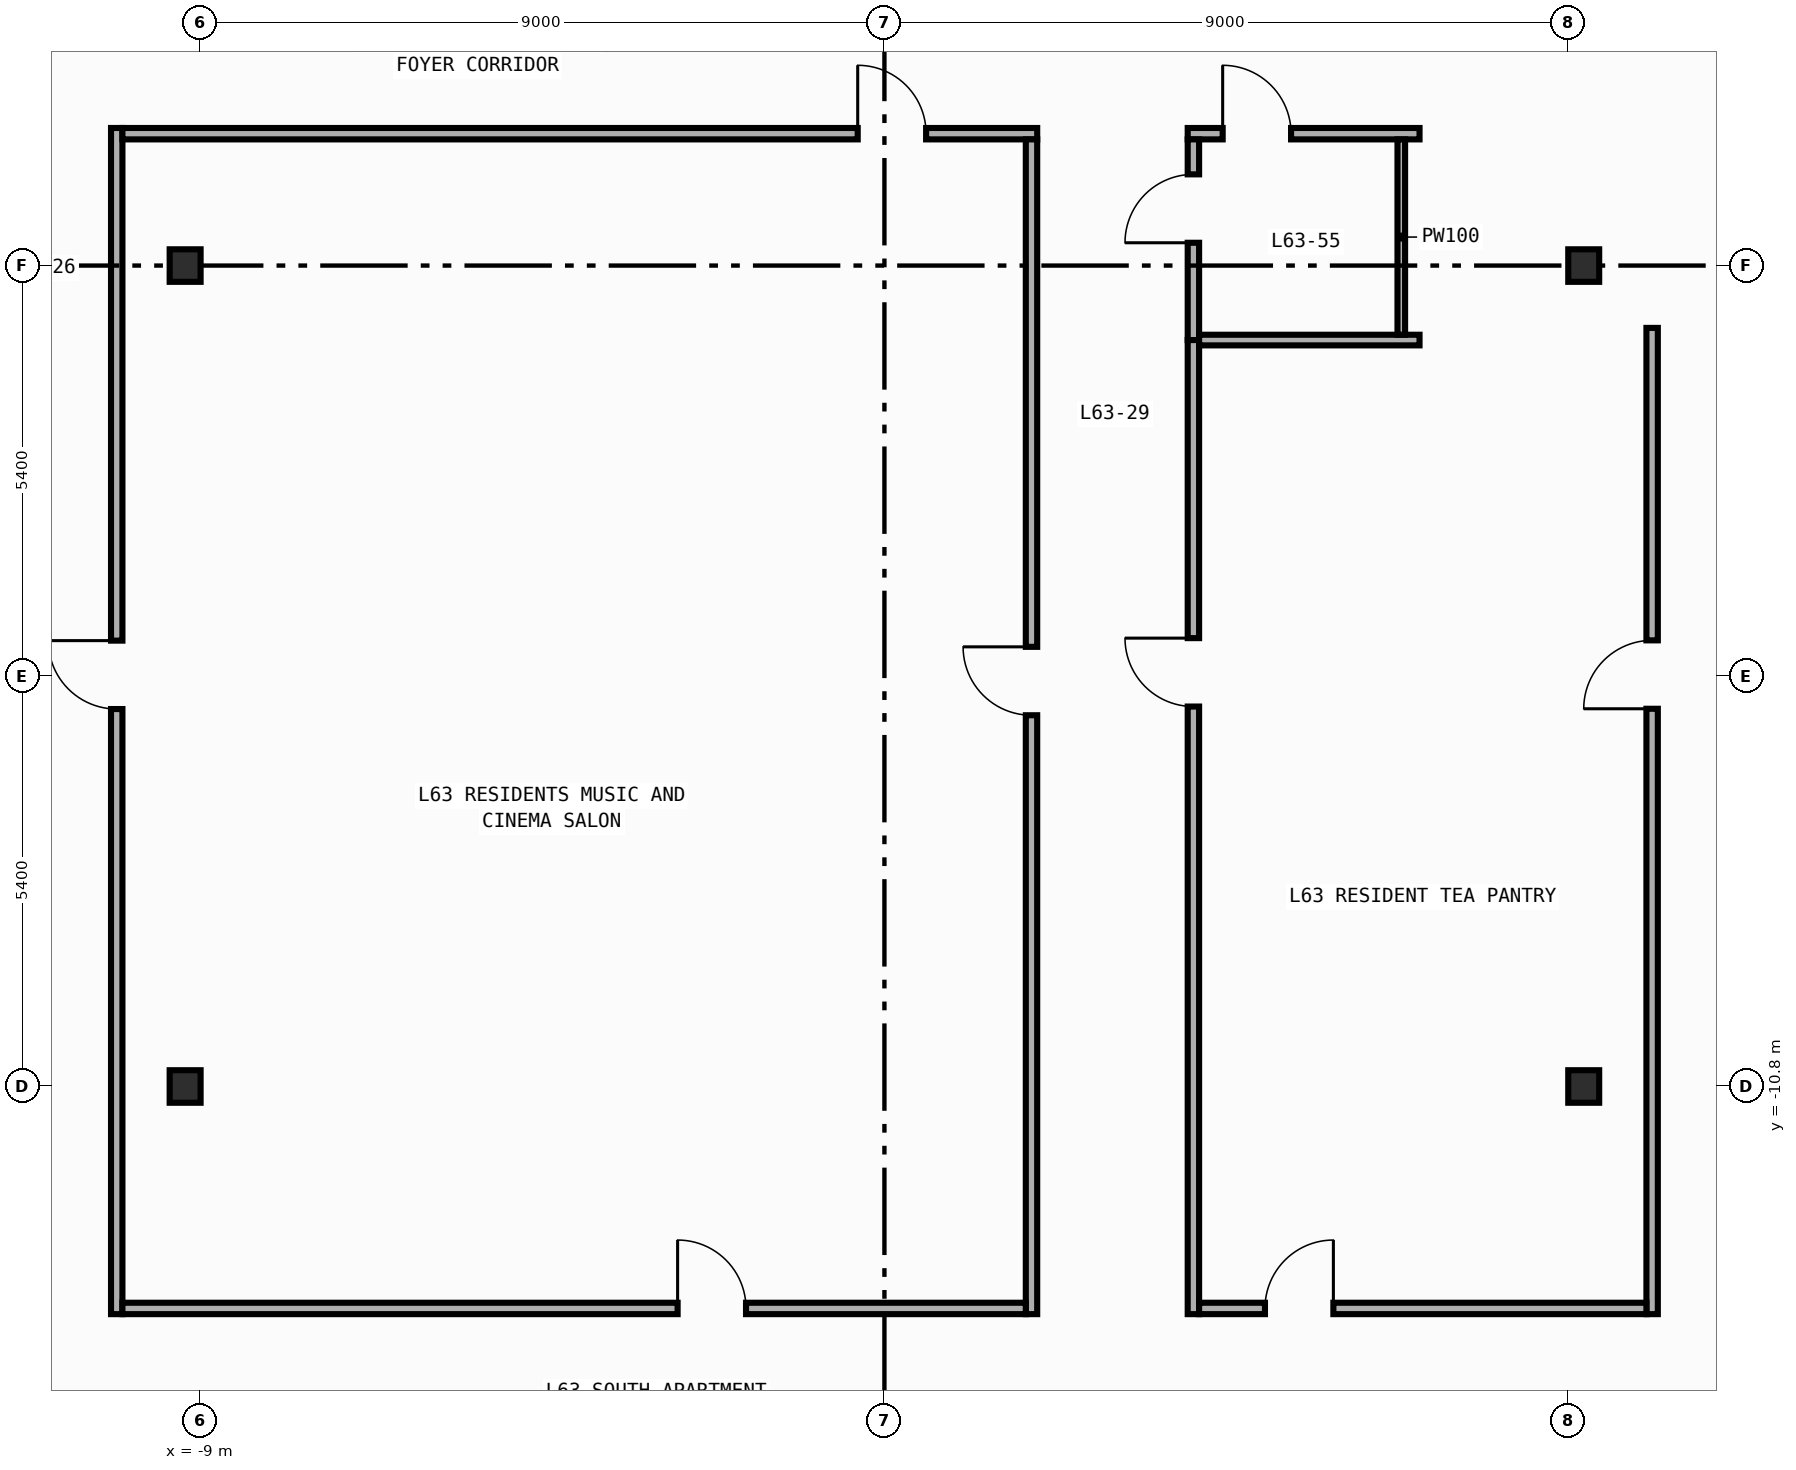
"""IFC4 building model, lengths in metres.
Left out: names, types, materials, properties, quantities, classifications, styles, units other than length and angle.
Written with IfcOpenShell. Run it as: python <this file> out.ifc"""

import sys

from ifc_helpers import new_model, si_unit, direction, frame, frame_2d, origin, origin_2d, place, context, subcontext, project, spatial, rectangle, i_section, extrude, element, fill, save


model = new_model("IFC4")
c1 = context("Model", 3, precision=1e-05, world=origin(), true_north=direction((0.0, 1.0)))
c2 = subcontext(c1, "Body", "Model", "MODEL_VIEW")
j1 = project(units=[si_unit("LENGTHUNIT", "METRE"), si_unit("PLANEANGLEUNIT", "RADIAN")], contexts=[c1])
p1 = place(None, origin())
s1 = spatial("IfcSite", under=j1, at=p1, CompositionType="ELEMENT")
p2 = place(p1, origin())
s2 = spatial("IfcBuilding", under=s1, at=p2, CompositionType="ELEMENT")
p3 = place(p2, frame((0.0, 0.0, 265.6)))
s3 = spatial("IfcBuildingStorey", under=s2, at=p3, CompositionType="ELEMENT", Elevation=265.6)
for number, where, z_axis, x_axis in (
    (1, (-9.2, -10.8, 0.0), (0.0, 0.0, 1.0), (1.0, 0.0, 0.0)),
    (2, (-9.2, 0.0, 0.0), (0.0, 0.0, 1.0), (1.0, 0.0, 0.0)),
    (3, (9.2, -10.8, 0.0), (0.0, 0.0, 1.0), (1.0, 0.0, 0.0)),
    (4, (9.2, 0.0, 0.0), (0.0, 0.0, 1.0), (1.0, 0.0, 0.0)),
):
    element("IfcColumn", number, at=place(p3, frame(where, z_axis=z_axis, x_axis=x_axis)), inside=s3, PredefinedType="COLUMN", context=c2, shape_type="SweptSolid", body=[
        extrude(i_section(OverallWidth=0.407, OverallDepth=0.428, WebThickness=0.02, FlangeThickness=0.035, FilletRadius=0.022, at=origin_2d()), origin(), (0.0, 0.0, 1.0), 3.6),
    ])
p4 = place(p3, frame((-10.1, -13.795, 0.0), z_axis=(0.0, 0.0, 1.0), x_axis=(0.0, 1.0, 0.0)))
e5 = element("IfcWall", 5, at=p4, inside=s3, PredefinedType="PARTITIONING", context=c2, shape_type="SweptSolid", body=[
    extrude(rectangle(XDim=15.605, YDim=0.15, at=frame_2d((7.802, 0.0))), origin(), (0.0, 0.0, 1.0), 3.34),
])
p5 = place(p4, frame((7.961, 0.0, 0.0)))
e6 = element("IfcOpeningElement", 6, at=p5, cuts=e5, PredefinedType="OPENING", context=c2, shape_type="SweptSolid", body=[
    extrude(rectangle(XDim=0.9, YDim=2.15, at=frame_2d((0.45, 1.075))), frame((0.0, 0.085, 0.0), z_axis=(0.0, -1.0, 0.0), x_axis=(1.0, 0.0, 0.0)), (0.0, 0.0, 1.0), 0.17),
])
p6 = place(p3, frame((10.1, -13.795, 0.0), z_axis=(0.0, 0.0, 1.0), x_axis=(0.0, 1.0, 0.0)))
e7 = element("IfcWall", 7, at=p6, inside=s3, PredefinedType="PARTITIONING", context=c2, shape_type="SweptSolid", body=[
    extrude(rectangle(XDim=12.975, YDim=0.15, at=frame_2d((6.487, 0.0))), origin(), (0.0, 0.0, 1.0), 3.34),
])
p7 = place(p6, frame((7.964, 0.0, 0.0)))
e8 = element("IfcOpeningElement", 8, at=p7, cuts=e7, PredefinedType="OPENING", context=c2, shape_type="SweptSolid", body=[
    extrude(rectangle(XDim=0.9, YDim=2.15, at=frame_2d((0.45, 1.075))), frame((0.0, 0.085, 0.0), z_axis=(0.0, -1.0, 0.0), x_axis=(1.0, 0.0, 0.0)), (0.0, 0.0, 1.0), 0.17),
])
p8 = place(p3, frame((-10.025, 1.735, 0.0), z_axis=(0.0, 0.0, 1.0), x_axis=(1.0, 0.0, 0.0)))
e9 = element("IfcWall", 9, at=p8, inside=s3, PredefinedType="PARTITIONING", context=c2, shape_type="SweptSolid", body=[
    extrude(rectangle(XDim=12.035, YDim=0.15, at=frame_2d((6.018, 0.0))), origin(), (0.0, 0.0, 1.0), 3.34),
])
p9 = place(p8, frame((9.674, 0.0, 0.0)))
e10 = element("IfcOpeningElement", 10, at=p9, cuts=e9, PredefinedType="OPENING", context=c2, shape_type="SweptSolid", body=[
    extrude(rectangle(XDim=0.9, YDim=2.15, at=frame_2d((0.45, 1.075))), frame((0.0, 0.085, 0.0), z_axis=(0.0, -1.0, 0.0), x_axis=(1.0, 0.0, 0.0)), (0.0, 0.0, 1.0), 0.17),
])
p10 = place(p3, frame((3.99, 1.735, 0.0), z_axis=(0.0, 0.0, 1.0), x_axis=(1.0, 0.0, 0.0)))
e11 = element("IfcWall", 11, at=p10, inside=s3, PredefinedType="PARTITIONING", context=c2, shape_type="SweptSolid", body=[
    extrude(rectangle(XDim=3.05, YDim=0.15, at=frame_2d((1.525, 0.0))), origin(), (0.0, 0.0, 1.0), 3.34),
])
p11 = place(p10, frame((0.46, 0.0, 0.0)))
e12 = element("IfcOpeningElement", 12, at=p11, cuts=e11, PredefinedType="OPENING", context=c2, shape_type="SweptSolid", body=[
    extrude(rectangle(XDim=0.9, YDim=2.15, at=frame_2d((0.45, 1.075))), frame((0.0, 0.085, 0.0), z_axis=(0.0, -1.0, 0.0), x_axis=(1.0, 0.0, 0.0)), (0.0, 0.0, 1.0), 0.17),
])
p12 = place(p3, frame((1.935, -13.795, 0.0), z_axis=(0.0, 0.0, 1.0), x_axis=(0.0, 1.0, 0.0)))
e13 = element("IfcWall", 13, at=p12, inside=s3, PredefinedType="PARTITIONING", context=c2, shape_type="SweptSolid", body=[
    extrude(rectangle(XDim=15.455, YDim=0.15, at=frame_2d((7.728, 0.0))), origin(), (0.0, 0.0, 1.0), 3.34),
])
p13 = place(p12, frame((7.879, 0.0, 0.0)))
e14 = element("IfcOpeningElement", 14, at=p13, cuts=e13, PredefinedType="OPENING", context=c2, shape_type="SweptSolid", body=[
    extrude(rectangle(XDim=0.9, YDim=2.15, at=frame_2d((0.45, 1.075))), frame((0.0, 0.085, 0.0), z_axis=(0.0, -1.0, 0.0), x_axis=(1.0, 0.0, 0.0)), (0.0, 0.0, 1.0), 0.17),
])
p14 = place(p3, frame((4.065, -0.98, 0.0), z_axis=(0.0, 0.0, 1.0), x_axis=(0.0, 1.0, 0.0)))
e15 = element("IfcWall", 15, at=p14, inside=s3, PredefinedType="PARTITIONING", context=c2, shape_type="SweptSolid", body=[
    extrude(rectangle(XDim=2.64, YDim=0.15, at=frame_2d((1.32, 0.0))), origin(), (0.0, 0.0, 1.0), 3.34),
])
p15 = place(p14, frame((1.28, 0.0, 0.0)))
e16 = element("IfcOpeningElement", 16, at=p15, cuts=e15, PredefinedType="OPENING", context=c2, shape_type="SweptSolid", body=[
    extrude(rectangle(XDim=0.9, YDim=2.15, at=frame_2d((0.45, 1.075))), frame((0.0, 0.085, 0.0), z_axis=(0.0, -1.0, 0.0), x_axis=(1.0, 0.0, 0.0)), (0.0, 0.0, 1.0), 0.17),
])
p16 = place(p3, frame((4.065, -13.795, 0.0), z_axis=(0.0, 0.0, 1.0), x_axis=(0.0, 1.0, 0.0)))
e17 = element("IfcWall", 17, at=p16, inside=s3, PredefinedType="PARTITIONING", context=c2, shape_type="SweptSolid", body=[
    extrude(rectangle(XDim=12.815, YDim=0.15, at=frame_2d((6.407, 0.0))), origin(), (0.0, 0.0, 1.0), 3.34),
])
p17 = place(p16, frame((7.994, 0.0, 0.0)))
e18 = element("IfcOpeningElement", 18, at=p17, cuts=e17, PredefinedType="OPENING", context=c2, shape_type="SweptSolid", body=[
    extrude(rectangle(XDim=0.9, YDim=2.15, at=frame_2d((0.45, 1.075))), frame((0.0, 0.085, 0.0), z_axis=(0.0, -1.0, 0.0), x_axis=(1.0, 0.0, 0.0)), (0.0, 0.0, 1.0), 0.17),
])
p18 = place(p3, frame((-10.025, -13.72, 0.0), z_axis=(0.0, 0.0, 1.0), x_axis=(1.0, 0.0, 0.0)))
e19 = element("IfcWall", 19, at=p18, inside=s3, PredefinedType="PARTITIONING", context=c2, shape_type="SweptSolid", body=[
    extrude(rectangle(XDim=11.885, YDim=0.15, at=frame_2d((5.942, 0.0))), origin(), (0.0, 0.0, 1.0), 3.34),
])
p19 = place(p18, frame((7.304, 0.0, 0.0)))
e20 = element("IfcOpeningElement", 20, at=p19, cuts=e19, PredefinedType="OPENING", context=c2, shape_type="SweptSolid", body=[
    extrude(rectangle(XDim=0.9, YDim=2.15, at=frame_2d((0.45, 1.075))), frame((0.0, 0.085, 0.0), z_axis=(0.0, -1.0, 0.0), x_axis=(1.0, 0.0, 0.0)), (0.0, 0.0, 1.0), 0.17),
])
p20 = place(p3, frame((4.14, -13.72, 0.0), z_axis=(0.0, 0.0, 1.0), x_axis=(1.0, 0.0, 0.0)))
e21 = element("IfcWall", 21, at=p20, inside=s3, PredefinedType="PARTITIONING", context=c2, shape_type="SweptSolid", body=[
    extrude(rectangle(XDim=5.885, YDim=0.15, at=frame_2d((2.942, 0.0))), origin(), (0.0, 0.0, 1.0), 3.34),
])
p21 = place(p20, frame((0.866, 0.0, 0.0)))
e22 = element("IfcOpeningElement", 22, at=p21, cuts=e21, PredefinedType="OPENING", context=c2, shape_type="SweptSolid", body=[
    extrude(rectangle(XDim=0.9, YDim=2.15, at=frame_2d((0.45, 1.075))), frame((0.0, 0.085, 0.0), z_axis=(0.0, -1.0, 0.0), x_axis=(1.0, 0.0, 0.0)), (0.0, 0.0, 1.0), 0.17),
])
p22 = place(p3, frame((4.14, -0.98, 0.0), z_axis=(0.0, 0.0, 1.0), x_axis=(1.0, 0.0, 0.0)))
e23 = element("IfcWall", 23, at=p22, inside=s3, PredefinedType="PARTITIONING", context=c2, shape_type="SweptSolid", body=[
    extrude(rectangle(XDim=2.9, YDim=0.14, at=frame_2d((1.45, 0.0))), origin(), (0.0, 0.0, 1.0), 3.34),
])
p23 = place(p3, frame((6.8, 1.66, 0.0), z_axis=(0.0, 0.0, 1.0), x_axis=(0.0, -1.0, 0.0)))
e24 = element("IfcWall", 24, at=p23, inside=s3, PredefinedType="PARTITIONING", context=c2, shape_type="SweptSolid", body=[
    extrude(rectangle(XDim=2.57, YDim=0.1, at=frame_2d((1.285, 0.0))), origin(), (0.0, 0.0, 1.0), 3.34),
])
p24 = place(p5, origin())
e25 = element("IfcDoor", 25, at=p24, inside=s3, OperationType="SINGLE_SWING_RIGHT", PredefinedType="DOOR", context=c2, shape_type="SweptSolid", body=[
    extrude(rectangle(XDim=0.9, YDim=2.15, at=frame_2d((0.45, 1.075))), frame((0.0, 0.025, 0.0), z_axis=(0.0, -1.0, 0.0), x_axis=(1.0, 0.0, 0.0)), (0.0, 0.0, 1.0), 0.05),
])
fill(e6, e25)
p25 = place(p7, origin())
e26 = element("IfcDoor", 26, at=p25, inside=s3, OperationType="SINGLE_SWING_LEFT", PredefinedType="DOOR", context=c2, shape_type="SweptSolid", body=[
    extrude(rectangle(XDim=0.9, YDim=2.15, at=frame_2d((0.45, 1.075))), frame((0.0, 0.025, 0.0), z_axis=(0.0, -1.0, 0.0), x_axis=(1.0, 0.0, 0.0)), (0.0, 0.0, 1.0), 0.05),
])
fill(e8, e26)
p26 = place(p9, origin())
e27 = element("IfcDoor", 27, at=p26, inside=s3, OperationType="SINGLE_SWING_LEFT", PredefinedType="DOOR", context=c2, shape_type="SweptSolid", body=[
    extrude(rectangle(XDim=0.9, YDim=2.15, at=frame_2d((0.45, 1.075))), frame((0.0, 0.025, 0.0), z_axis=(0.0, -1.0, 0.0), x_axis=(1.0, 0.0, 0.0)), (0.0, 0.0, 1.0), 0.05),
])
fill(e10, e27)
p27 = place(p11, origin())
e28 = element("IfcDoor", 28, at=p27, inside=s3, OperationType="SINGLE_SWING_LEFT", PredefinedType="DOOR", context=c2, shape_type="SweptSolid", body=[
    extrude(rectangle(XDim=0.9, YDim=2.15, at=frame_2d((0.45, 1.075))), frame((0.0, 0.025, 0.0), z_axis=(0.0, -1.0, 0.0), x_axis=(1.0, 0.0, 0.0)), (0.0, 0.0, 1.0), 0.05),
])
fill(e12, e28)
p28 = place(p13, origin())
e29 = element("IfcDoor", 29, at=p28, inside=s3, OperationType="SINGLE_SWING_RIGHT", PredefinedType="DOOR", context=c2, shape_type="SweptSolid", body=[
    extrude(rectangle(XDim=0.9, YDim=2.15, at=frame_2d((0.45, 1.075))), frame((0.0, 0.025, 0.0), z_axis=(0.0, -1.0, 0.0), x_axis=(1.0, 0.0, 0.0)), (0.0, 0.0, 1.0), 0.05),
])
fill(e14, e29)
p29 = place(p15, origin())
e30 = element("IfcDoor", 30, at=p29, inside=s3, OperationType="SINGLE_SWING_LEFT", PredefinedType="DOOR", context=c2, shape_type="SweptSolid", body=[
    extrude(rectangle(XDim=0.9, YDim=2.15, at=frame_2d((0.45, 1.075))), frame((0.0, 0.025, 0.0), z_axis=(0.0, -1.0, 0.0), x_axis=(1.0, 0.0, 0.0)), (0.0, 0.0, 1.0), 0.05),
])
fill(e16, e30)
p30 = place(p17, origin())
e31 = element("IfcDoor", 31, at=p30, inside=s3, OperationType="SINGLE_SWING_RIGHT", PredefinedType="DOOR", context=c2, shape_type="SweptSolid", body=[
    extrude(rectangle(XDim=0.9, YDim=2.15, at=frame_2d((0.45, 1.075))), frame((0.0, 0.025, 0.0), z_axis=(0.0, -1.0, 0.0), x_axis=(1.0, 0.0, 0.0)), (0.0, 0.0, 1.0), 0.05),
])
fill(e18, e31)
p31 = place(p19, origin())
e32 = element("IfcDoor", 32, at=p31, inside=s3, OperationType="SINGLE_SWING_LEFT", PredefinedType="DOOR", context=c2, shape_type="SweptSolid", body=[
    extrude(rectangle(XDim=0.9, YDim=2.15, at=frame_2d((0.45, 1.075))), frame((0.0, 0.025, 0.0), z_axis=(0.0, -1.0, 0.0), x_axis=(1.0, 0.0, 0.0)), (0.0, 0.0, 1.0), 0.05),
])
fill(e20, e32)
p32 = place(p21, origin())
e33 = element("IfcDoor", 33, at=p32, inside=s3, OperationType="SINGLE_SWING_RIGHT", PredefinedType="DOOR", context=c2, shape_type="SweptSolid", body=[
    extrude(rectangle(XDim=0.9, YDim=2.15, at=frame_2d((0.45, 1.075))), frame((0.0, 0.025, 0.0), z_axis=(0.0, -1.0, 0.0), x_axis=(1.0, 0.0, 0.0)), (0.0, 0.0, 1.0), 0.05),
])
fill(e22, e33)
save(model, sys.argv[1])
